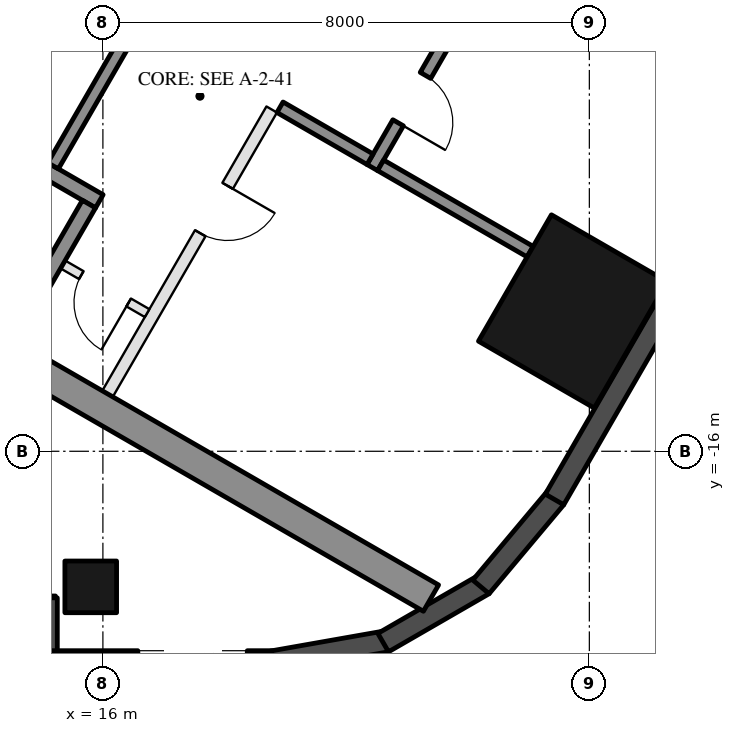
"""IFC4 building model, lengths in metres.
Left out: names, types, materials, properties, quantities, classifications, styles, units other than length and angle.
Written with IfcOpenShell. Run it as: python <this file> out.ifc"""

import sys

from ifc_helpers import new_model, si_unit, direction, frame, frame_2d, origin, origin_2d, place, context, subcontext, project, spatial, rectangle, hollow_rectangle, extrude, element, fill, save


model = new_model("IFC4")
c1 = context("Model", 3, precision=1e-05, world=origin(), true_north=direction((0.0, 1.0)))
c2 = subcontext(c1, "Body", "Model", "MODEL_VIEW")
j1 = project(units=[si_unit("LENGTHUNIT", "METRE"), si_unit("PLANEANGLEUNIT", "RADIAN")], contexts=[c1])
p1 = place(None, origin())
s1 = spatial("IfcSite", under=j1, at=p1, CompositionType="ELEMENT")
p2 = place(p1, origin())
s2 = spatial("IfcBuilding", under=s1, at=p2, CompositionType="ELEMENT")
p3 = place(p2, frame((0.0, 0.0, 176.2)))
s3 = spatial("IfcBuildingStorey", under=s2, at=p3, CompositionType="ELEMENT", Elevation=176.2)
p4 = place(p3, frame((15.8, -18.23, 0.0), z_axis=(0.0, 0.0, 1.0), x_axis=(-1.0, 0.0, 0.0)))
e1 = element("IfcColumn", 1, at=p4, inside=s3, PredefinedType="COLUMN", context=c2, shape_type="SweptSolid", body=[
    extrude(hollow_rectangle(XDim=0.85, YDim=0.85, WallThickness=0.04, at=origin_2d()), origin(), (0.0, 0.0, 1.0), 3.7),
])
p5 = place(p3, frame((23.729, -13.7, 0.0), z_axis=(0.0, 0.0, 1.0), x_axis=(0.5, 0.866025403784, 0.0)))
e2 = element("IfcColumn", 2, at=p5, inside=s3, PredefinedType="COLUMN", context=c2, shape_type="SweptSolid", body=[
    extrude(hollow_rectangle(XDim=2.4, YDim=2.2, WallThickness=0.06, at=origin_2d()), origin(), (0.0, 0.0, 1.0), 3.7),
])
p6 = place(p3, frame((8.48, -18.555, 0.0), z_axis=(0.0, 0.0, 1.0), x_axis=(1.0, 0.0, 0.0)))
e3 = element("IfcWall", 3, at=p6, inside=s3, PredefinedType="SOLIDWALL", context=c2, shape_type="SweptSolid", body=[
    extrude(rectangle(XDim=6.74, YDim=0.35, at=frame_2d((3.37, 0.0))), origin(), (0.0, 0.0, 1.0), 3.55),
])
p7 = place(p6, frame((3.57, 0.0, 0.0)))
e4 = element("IfcOpeningElement", 4, at=p7, cuts=e3, PredefinedType="OPENING", context=c2, shape_type="SweptSolid", body=[
    extrude(rectangle(XDim=2.4, YDim=2.4, at=frame_2d((1.2, 1.2))), frame((0.0, 0.185, 0.0), z_axis=(0.0, -1.0, 0.0), x_axis=(1.0, 0.0, 0.0)), (0.0, 0.0, 1.0), 0.37),
])
p8 = place(p6, frame((0.32, 0.0, 0.3)))
e5 = element("IfcOpeningElement", 5, at=p8, cuts=e3, PredefinedType="OPENING", context=c2, shape_type="SweptSolid", body=[
    extrude(rectangle(XDim=2.9, YDim=2.65, at=frame_2d((1.45, 1.325))), frame((0.0, 0.185, 0.0), z_axis=(0.0, -1.0, 0.0), x_axis=(1.0, 0.0, 0.0)), (0.0, 0.0, 1.0), 0.37),
])
p9 = place(p3, frame((15.075, -18.41, 0.0), z_axis=(0.0, 0.0, 1.0), x_axis=(0.0, -1.0, 0.0)))
e6 = element("IfcWall", 6, at=p9, inside=s3, PredefinedType="SOLIDWALL", context=c2, shape_type="SweptSolid", body=[
    extrude(rectangle(XDim=1.22, YDim=0.35, at=frame_2d((0.61, 0.0))), origin(), (0.0, 0.0, 1.0), 3.55),
])
p10 = place(p3, frame((14.9, -19.455, 0.0), z_axis=(0.0, 0.0, 1.0), x_axis=(1.0, 0.0, 0.0)))
e7 = element("IfcWall", 7, at=p10, inside=s3, PredefinedType="SOLIDWALL", context=c2, shape_type="SweptSolid", body=[
    extrude(rectangle(XDim=3.916, YDim=0.35, at=frame_2d((1.958, 0.0))), origin(), (0.0, 0.0, 1.0), 3.55),
])
p11 = place(p10, frame((1.675, 0.0, 0.3)))
e8 = element("IfcOpeningElement", 8, at=p11, cuts=e7, PredefinedType="OPENING", context=c2, shape_type="SweptSolid", body=[
    extrude(rectangle(XDim=1.8, YDim=2.65, at=frame_2d((0.9, 1.325))), frame((0.0, 0.185, 0.0), z_axis=(0.0, -1.0, 0.0), x_axis=(1.0, 0.0, 0.0)), (0.0, 0.0, 1.0), 0.37),
])
p12 = place(p3, frame((18.785, -19.458, 0.0), z_axis=(0.0, 0.0, 1.0), x_axis=(0.984798995425, 0.173697837091, 0.0)))
e9 = element("IfcWall", 9, at=p12, inside=s3, PredefinedType="SOLIDWALL", context=c2, shape_type="SweptSolid", body=[
    extrude(rectangle(XDim=1.91, YDim=0.35, at=frame_2d((0.955, 0.0))), origin(), (0.0, 0.0, 1.0), 3.55),
])
for number, where, z_axis, x_axis in (
    (10, (20.61, -19.147, 0.0), (0.0, 0.0, 1.0), (0.866, 0.5, 0.0)),
    (11, (22.217, -18.231, 0.0), (0.0, 0.0, 1.0), (0.643, 0.766, 0.0)),
):
    element("IfcWall", number, at=place(p3, frame(where, z_axis=z_axis, x_axis=x_axis)), inside=s3, PredefinedType="SOLIDWALL", context=c2, shape_type="SweptSolid", body=[
        extrude(rectangle(XDim=1.91, YDim=0.35, at=frame_2d((0.955, 0.0))), origin(), (0.0, 0.0, 1.0), 3.55),
    ])
p13 = place(p3, frame((23.427, -16.792, 0.0), z_axis=(0.0, 0.0, 1.0), x_axis=(0.500018773155, 0.866014564827, 0.0)))
e12 = element("IfcWall", 12, at=p13, inside=s3, PredefinedType="SOLIDWALL", context=c2, shape_type="SweptSolid", body=[
    extrude(rectangle(XDim=5.658, YDim=0.35, at=frame_2d((2.829, 0.0))), origin(), (0.0, 0.0, 1.0), 3.55),
])
for number, where, z_axis, x_axis in (
    (13, (8.547, -10.997, 0.0), (0.0, 0.0, 1.0), (0.866, -0.5, 0.0)),
    (14, (13.797, -1.903, 0.0), (0.0, 0.0, 1.0), (0.866, -0.5, 0.0)),
):
    element("IfcWall", number, at=place(p3, frame(where, z_axis=z_axis, x_axis=x_axis)), inside=s3, PredefinedType="SHEAR", context=c2, shape_type="SweptSolid", body=[
        extrude(rectangle(XDim=14.837, YDim=0.5, at=frame_2d((7.418, 0.0))), origin(), (0.0, 0.0, 1.0), 3.5),
    ])
p14 = place(p3, frame((10.356, -8.664, 0.0), z_axis=(0.0, 0.0, 1.0), x_axis=(0.866028629588, -0.499994412703, 0.0)))
e15 = element("IfcWall", 15, at=p14, inside=s3, PredefinedType="SHEAR", context=c2, shape_type="SweptSolid", body=[
    extrude(rectangle(XDim=6.45, YDim=0.25, at=frame_2d((3.225, 0.0))), origin(), (0.0, 0.0, 1.0), 3.5),
])
p15 = place(p14, frame((0.3, 0.0, 0.0)))
e16 = element("IfcOpeningElement", 16, at=p15, cuts=e15, PredefinedType="OPENING", context=c2, shape_type="SweptSolid", body=[
    extrude(rectangle(XDim=1.0, YDim=2.1, at=frame_2d((0.5, 1.05))), frame((0.0, 0.135, 0.0), z_axis=(0.0, -1.0, 0.0), x_axis=(1.0, 0.0, 0.0)), (0.0, 0.0, 1.0), 0.27),
])
p16 = place(p3, frame((14.496, -14.143, 0.0), z_axis=(0.0, 0.0, 1.0), x_axis=(0.500062241894, 0.865989465428, 0.0)))
e17 = element("IfcWall", 17, at=p16, inside=s3, PredefinedType="SHEAR", context=c2, shape_type="SweptSolid", body=[
    extrude(rectangle(XDim=2.55, YDim=0.25, at=frame_2d((1.275, 0.0))), origin(), (0.0, 0.0, 1.0), 3.5),
])
p17 = place(p3, frame((15.181, -11.305, 0.0), z_axis=(0.0, 0.0, 1.0), x_axis=(0.49994636267, 0.866056369097, 0.0)))
e18 = element("IfcWall", 18, at=p17, inside=s3, PredefinedType="SHEAR", context=c2, shape_type="SweptSolid", body=[
    extrude(rectangle(XDim=2.8, YDim=0.2, at=frame_2d((1.4, 0.0))), origin(), (0.0, 0.0, 1.0), 3.5),
])
p18 = place(p3, frame((20.43, -11.333, 0.0), z_axis=(0.0, 0.0, 1.0), x_axis=(0.500001309137, 0.866024647952, 0.0)))
e19 = element("IfcWall", 19, at=p18, inside=s3, PredefinedType="SHEAR", context=c2, shape_type="SweptSolid", body=[
    extrude(rectangle(XDim=2.4, YDim=0.2, at=frame_2d((1.2, 0.0))), origin(), (0.0, 0.0, 1.0), 3.5),
])
p19 = place(p18, frame((0.85, 0.0, 0.0)))
e20 = element("IfcOpeningElement", 20, at=p19, cuts=e19, PredefinedType="OPENING", context=c2, shape_type="SweptSolid", body=[
    extrude(rectangle(XDim=0.9, YDim=2.1, at=frame_2d((0.45, 1.05))), frame((0.0, 0.11, 0.0), z_axis=(0.0, -1.0, 0.0), x_axis=(1.0, 0.0, 0.0)), (0.0, 0.0, 1.0), 0.22),
])
p20 = place(p3, frame((18.913, -10.342, 0.0), z_axis=(0.0, 0.0, 1.0), x_axis=(0.866038183914, -0.499977863513, 0.0)))
e21 = element("IfcWall", 21, at=p20, inside=s3, PredefinedType="SHEAR", context=c2, shape_type="SweptSolid", body=[
    extrude(rectangle(XDim=1.71, YDim=0.2, at=frame_2d((0.855, 0.0))), origin(), (0.0, 0.0, 1.0), 3.5),
])
p21 = place(p3, frame((20.567, -11.297, 0.0), z_axis=(0.0, 0.0, 1.0), x_axis=(0.866055327414, -0.49994816717, 0.0)))
e22 = element("IfcWall", 22, at=p21, inside=s3, PredefinedType="SHEAR", context=c2, shape_type="SweptSolid", body=[
    extrude(rectangle(XDim=2.84, YDim=0.2, at=frame_2d((1.42, 0.0))), origin(), (0.0, 0.0, 1.0), 3.5),
])
p22 = place(p3, frame((16.076, -15.055, 0.0), z_axis=(0.0, 0.0, 1.0), x_axis=(0.499995103361, 0.866028230842, 0.0)))
e23 = element("IfcWall", 23, at=p22, inside=s3, PredefinedType="PARTITIONING", context=c2, shape_type="SweptSolid", body=[
    extrude(rectangle(XDim=5.4, YDim=0.2, at=frame_2d((2.7, 0.0))), origin(), (0.0, 0.0, 1.0), 3.5),
])
p23 = place(p22, frame((3.05, 0.0, 0.0)))
e24 = element("IfcOpeningElement", 24, at=p23, cuts=e23, PredefinedType="OPENING", context=c2, shape_type="SweptSolid", body=[
    extrude(rectangle(XDim=0.9, YDim=2.1, at=frame_2d((0.45, 1.05))), frame((0.0, 0.11, 0.0), z_axis=(0.0, -1.0, 0.0), x_axis=(1.0, 0.0, 0.0)), (0.0, 0.0, 1.0), 0.22),
])
p24 = place(p3, frame((15.342, -12.928, 0.0), z_axis=(0.0, 0.0, 1.0), x_axis=(0.865989903783, -0.500061482766, 0.0)))
e25 = element("IfcWall", 25, at=p24, inside=s3, PredefinedType="PARTITIONING", context=c2, shape_type="SweptSolid", body=[
    extrude(rectangle(XDim=1.6, YDim=0.15, at=frame_2d((0.8, 0.0))), origin(), (0.0, 0.0, 1.0), 3.5),
])
p25 = place(p24, frame((0.35, 0.0, 0.0)))
e26 = element("IfcOpeningElement", 26, at=p25, cuts=e25, PredefinedType="OPENING", context=c2, shape_type="SweptSolid", body=[
    extrude(rectangle(XDim=0.9, YDim=2.1, at=frame_2d((0.45, 1.05))), frame((0.0, 0.085, 0.0), z_axis=(0.0, -1.0, 0.0), x_axis=(1.0, 0.0, 0.0)), (0.0, 0.0, 1.0), 0.17),
])
p26 = place(p25, frame((0.9, 0.0, 0.0), z_axis=(0.0, 0.0, 1.0), x_axis=(-1.0, 0.0, 0.0)))
e27 = element("IfcDoor", 27, at=p26, inside=s3, OperationType="SINGLE_SWING_LEFT", PredefinedType="DOOR", context=c2, shape_type="SweptSolid", body=[
    extrude(rectangle(XDim=0.9, YDim=2.1, at=frame_2d((0.45, 1.05))), frame((0.0, 0.025, 0.0), z_axis=(0.0, -1.0, 0.0), x_axis=(1.0, 0.0, 0.0)), (0.0, 0.0, 1.0), 0.05),
])
fill(e26, e27)
p27 = place(p19, frame((0.9, 0.0, 0.0), z_axis=(0.0, 0.0, 1.0), x_axis=(-1.0, 0.0, 0.0)))
e28 = element("IfcDoor", 28, at=p27, inside=s3, OperationType="SINGLE_SWING_RIGHT", PredefinedType="DOOR", context=c2, shape_type="SweptSolid", body=[
    extrude(rectangle(XDim=0.9, YDim=2.1, at=frame_2d((0.45, 1.05))), frame((0.0, 0.025, 0.0), z_axis=(0.0, -1.0, 0.0), x_axis=(1.0, 0.0, 0.0)), (0.0, 0.0, 1.0), 0.05),
])
fill(e20, e28)
p28 = place(p23, frame((0.9, 0.0, 0.0), z_axis=(0.0, 0.0, 1.0), x_axis=(-1.0, 0.0, 0.0)))
e29 = element("IfcDoor", 29, at=p28, inside=s3, OperationType="SINGLE_SWING_LEFT", PredefinedType="DOOR", context=c2, shape_type="SweptSolid", body=[
    extrude(rectangle(XDim=0.9, YDim=2.1, at=frame_2d((0.45, 1.05))), frame((0.0, 0.025, 0.0), z_axis=(0.0, -1.0, 0.0), x_axis=(1.0, 0.0, 0.0)), (0.0, 0.0, 1.0), 0.05),
])
fill(e24, e29)
save(model, sys.argv[1])
